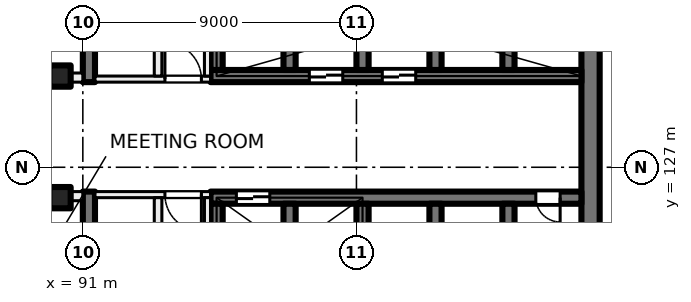
"""IFC4 building model, lengths in metres.
Left out: names, types, materials, properties, quantities, classifications, styles, units other than length and angle.
Written with IfcOpenShell. Run it as: python <this file> out.ifc"""

import sys

from ifc_helpers import new_model, si_unit, direction, frame, frame_2d, origin, origin_2d, place, context, subcontext, project, spatial, rectangle, extrude, element, fill, save


model = new_model("IFC4")
c1 = context("Model", 3, precision=1e-05, world=origin(), true_north=direction((0.0, 1.0)))
c2 = subcontext(c1, "Body", "Model", "MODEL_VIEW")
j1 = project(units=[si_unit("LENGTHUNIT", "METRE"), si_unit("PLANEANGLEUNIT", "RADIAN")], contexts=[c1])
p1 = place(None, origin())
s1 = spatial("IfcSite", under=j1, at=p1, CompositionType="ELEMENT")
p2 = place(p1, origin())
s2 = spatial("IfcBuilding", under=s1, at=p2, CompositionType="ELEMENT")
p3 = place(p2, frame((0.0, 0.0, 39.5)))
s3 = spatial("IfcBuildingStorey", under=s2, at=p3, CompositionType="ELEMENT", Elevation=39.5)
for number, where, z_axis, x_axis in (
    (1, (90.25, 130.0, 0.0), (0.0, 0.0, 1.0), (1.0, 0.0, 0.0)),
    (2, (90.25, 126.0, 0.0), (0.0, 0.0, 1.0), (1.0, 0.0, 0.0)),
):
    element("IfcColumn", number, at=place(p3, frame(where, z_axis=z_axis, x_axis=x_axis)), inside=s3, PredefinedType="COLUMN", context=c2, shape_type="SweptSolid", body=[
        extrude(rectangle(XDim=0.7, YDim=0.7, at=origin_2d()), origin(), (0.0, 0.0, 1.0), 4.0),
    ])
p4 = place(p3, frame((107.7, 135.2, 0.0), z_axis=(0.0, 0.0, 1.0), x_axis=(0.0, -1.0, 0.0)))
e3 = element("IfcWall", 3, at=p4, inside=s3, PredefinedType="SHEAR", context=c2, shape_type="SweptSolid", body=[
    extrude(rectangle(XDim=14.4, YDim=0.6, at=frame_2d((7.2, 0.0))), origin(), (0.0, 0.0, 1.0), 4.0),
])
p5 = place(p3, frame((107.4, 130.0, 0.0), z_axis=(0.0, 0.0, 1.0), x_axis=(-1.0, 0.0, 0.0)))
e4 = element("IfcWall", 4, at=p5, inside=s3, PredefinedType="SHEAR", context=c2, shape_type="SweptSolid", body=[
    extrude(rectangle(XDim=12.2, YDim=0.4, at=frame_2d((6.1, 0.0))), origin(), (0.0, 0.0, 1.0), 4.0),
])
p6 = place(p5, frame((5.45, 0.0, 0.0)))
e5 = element("IfcOpeningElement", 5, at=p6, cuts=e4, PredefinedType="OPENING", context=c2, shape_type="SweptSolid", body=[
    extrude(rectangle(XDim=1.1, YDim=2.1, at=frame_2d((0.55, 1.05))), frame((0.0, 0.21, 0.0), z_axis=(0.0, -1.0, 0.0), x_axis=(1.0, 0.0, 0.0)), (0.0, 0.0, 1.0), 0.42),
])
p7 = place(p5, frame((7.85, 0.0, 0.0)))
e6 = element("IfcOpeningElement", 6, at=p7, cuts=e4, PredefinedType="OPENING", context=c2, shape_type="SweptSolid", body=[
    extrude(rectangle(XDim=1.1, YDim=2.1, at=frame_2d((0.55, 1.05))), frame((0.0, 0.21, 0.0), z_axis=(0.0, -1.0, 0.0), x_axis=(1.0, 0.0, 0.0)), (0.0, 0.0, 1.0), 0.42),
])
for number, where, z_axis, x_axis in (
    (7, (105.0, 133.2, 0.0), (0.0, 0.0, 1.0), (0.0, -1.0, 0.0)),
    (8, (102.6, 133.2, 0.0), (0.0, 0.0, 1.0), (0.0, -1.0, 0.0)),
    (9, (100.2, 133.2, 0.0), (0.0, 0.0, 1.0), (0.0, -1.0, 0.0)),
    (10, (97.8, 133.2, 0.0), (0.0, 0.0, 1.0), (0.0, -1.0, 0.0)),
    (11, (95.4, 133.2, 0.0), (0.0, 0.0, 1.0), (0.0, -1.0, 0.0)),
):
    element("IfcWall", number, at=place(p3, frame(where, z_axis=z_axis, x_axis=x_axis)), inside=s3, PredefinedType="SHEAR", context=c2, shape_type="SweptSolid", body=[
        extrude(rectangle(XDim=3.0, YDim=0.4, at=frame_2d((1.5, 0.0))), origin(), (0.0, 0.0, 1.0), 4.0),
    ])
p8 = place(p3, frame((107.4, 126.0, 0.0), z_axis=(0.0, 0.0, 1.0), x_axis=(-1.0, 0.0, 0.0)))
e12 = element("IfcWall", 12, at=p8, inside=s3, PredefinedType="SHEAR", context=c2, shape_type="SweptSolid", body=[
    extrude(rectangle(XDim=12.2, YDim=0.4, at=frame_2d((6.1, 0.0))), origin(), (0.0, 0.0, 1.0), 4.0),
])
p9 = place(p8, frame((10.25, 0.0, 0.0)))
e13 = element("IfcOpeningElement", 13, at=p9, cuts=e12, PredefinedType="OPENING", context=c2, shape_type="SweptSolid", body=[
    extrude(rectangle(XDim=1.1, YDim=2.1, at=frame_2d((0.55, 1.05))), frame((0.0, 0.21, 0.0), z_axis=(0.0, -1.0, 0.0), x_axis=(1.0, 0.0, 0.0)), (0.0, 0.0, 1.0), 0.42),
])
p10 = place(p8, frame((0.7, 0.0, 0.0)))
e14 = element("IfcOpeningElement", 14, at=p10, cuts=e12, PredefinedType="OPENING", context=c2, shape_type="SweptSolid", body=[
    extrude(rectangle(XDim=0.8, YDim=2.1, at=frame_2d((0.4, 1.05))), frame((0.0, 0.21, 0.0), z_axis=(0.0, -1.0, 0.0), x_axis=(1.0, 0.0, 0.0)), (0.0, 0.0, 1.0), 0.42),
])
for number, where, z_axis, x_axis in (
    (15, (105.0, 125.8, 0.0), (0.0, 0.0, 1.0), (0.0, -1.0, 0.0)),
    (16, (102.6, 125.8, 0.0), (0.0, 0.0, 1.0), (0.0, -1.0, 0.0)),
    (17, (100.2, 125.8, 0.0), (0.0, 0.0, 1.0), (0.0, -1.0, 0.0)),
    (18, (97.8, 125.8, 0.0), (0.0, 0.0, 1.0), (0.0, -1.0, 0.0)),
    (19, (95.4, 125.8, 0.0), (0.0, 0.0, 1.0), (0.0, -1.0, 0.0)),
):
    element("IfcWall", number, at=place(p3, frame(where, z_axis=z_axis, x_axis=x_axis)), inside=s3, PredefinedType="SHEAR", context=c2, shape_type="SweptSolid", body=[
        extrude(rectangle(XDim=3.0, YDim=0.4, at=frame_2d((1.5, 0.0))), origin(), (0.0, 0.0, 1.0), 4.0),
    ])
for number, where, z_axis, x_axis in (
    (20, (91.2, 138.4, 0.0), (0.0, 0.0, 1.0), (0.0, -1.0, 0.0)),
    (21, (91.2, 126.2, 0.0), (0.0, 0.0, 1.0), (0.0, -1.0, 0.0)),
):
    element("IfcWall", number, at=place(p3, frame(where, z_axis=z_axis, x_axis=x_axis)), inside=s3, PredefinedType="SHEAR", context=c2, shape_type="SweptSolid", body=[
        extrude(rectangle(XDim=8.6, YDim=0.4, at=frame_2d((4.3, 0.0))), origin(), (0.0, 0.0, 1.0), 4.0),
    ])
p11 = place(p3, frame((95.2, 126.1, 0.0), z_axis=(0.0, 0.0, 1.0), x_axis=(-1.0, 0.0, 0.0)))
e22 = element("IfcWall", 22, at=p11, inside=s3, PredefinedType="PARTITIONING", context=c2, shape_type="SweptSolid", body=[
    extrude(rectangle(XDim=3.8, YDim=0.2, at=frame_2d((1.9, 0.0))), origin(), (0.0, 0.0, 1.0), 3.625),
])
p12 = place(p11, frame((0.3, 0.0, 0.0)))
e23 = element("IfcOpeningElement", 23, at=p12, cuts=e22, PredefinedType="OPENING", context=c2, shape_type="SweptSolid", body=[
    extrude(rectangle(XDim=1.2, YDim=2.1, at=frame_2d((0.6, 1.05))), frame((0.0, 0.11, 0.0), z_axis=(0.0, -1.0, 0.0), x_axis=(1.0, 0.0, 0.0)), (0.0, 0.0, 1.0), 0.22),
])
p13 = place(p3, frame((95.1, 117.6, 0.0), z_axis=(0.0, 0.0, 1.0), x_axis=(0.0, 1.0, 0.0)))
e24 = element("IfcWall", 24, at=p13, inside=s3, PredefinedType="PARTITIONING", context=c2, shape_type="SweptSolid", body=[
    extrude(rectangle(XDim=8.4, YDim=0.2, at=frame_2d((4.2, 0.0))), origin(), (0.0, 0.0, 1.0), 3.625),
])
p14 = place(p13, frame((1.65, 0.0, 0.0)))
e25 = element("IfcOpeningElement", 25, at=p14, cuts=e24, PredefinedType="OPENING", context=c2, shape_type="SweptSolid", body=[
    extrude(rectangle(XDim=1.5, YDim=2.1, at=frame_2d((0.75, 1.05))), frame((0.0, 0.11, 0.0), z_axis=(0.0, -1.0, 0.0), x_axis=(1.0, 0.0, 0.0)), (0.0, 0.0, 1.0), 0.22),
])
p15 = place(p3, frame((93.475, 117.6, 0.0), z_axis=(0.0, 0.0, 1.0), x_axis=(0.0, 1.0, 0.0)))
e26 = element("IfcWall", 26, at=p15, inside=s3, PredefinedType="PARTITIONING", context=c2, shape_type="SweptSolid", body=[
    extrude(rectangle(XDim=8.4, YDim=0.25, at=frame_2d((4.2, 0.0))), origin(), (0.0, 0.0, 1.0), 3.625),
])
p16 = place(p15, frame((5.825, 0.0, 0.0)))
e27 = element("IfcOpeningElement", 27, at=p16, cuts=e26, PredefinedType="OPENING", context=c2, shape_type="SweptSolid", body=[
    extrude(rectangle(XDim=1.0, YDim=2.1, at=frame_2d((0.5, 1.05))), frame((0.0, 0.135, 0.0), z_axis=(0.0, -1.0, 0.0), x_axis=(1.0, 0.0, 0.0)), (0.0, 0.0, 1.0), 0.27),
])
p17 = place(p15, frame((1.575, 0.0, 0.0)))
e28 = element("IfcOpeningElement", 28, at=p17, cuts=e26, PredefinedType="OPENING", context=c2, shape_type="SweptSolid", body=[
    extrude(rectangle(XDim=1.0, YDim=2.1, at=frame_2d((0.5, 1.05))), frame((0.0, 0.135, 0.0), z_axis=(0.0, -1.0, 0.0), x_axis=(1.0, 0.0, 0.0)), (0.0, 0.0, 1.0), 0.27),
])
p18 = place(p3, frame((91.4, 129.9, 0.0), z_axis=(0.0, 0.0, 1.0), x_axis=(1.0, 0.0, 0.0)))
e29 = element("IfcWall", 29, at=p18, inside=s3, PredefinedType="PARTITIONING", context=c2, shape_type="SweptSolid", body=[
    extrude(rectangle(XDim=3.8, YDim=0.2, at=frame_2d((1.9, 0.0))), origin(), (0.0, 0.0, 1.0), 3.625),
])
p19 = place(p18, frame((2.3, 0.0, 0.0)))
e30 = element("IfcOpeningElement", 30, at=p19, cuts=e29, PredefinedType="OPENING", context=c2, shape_type="SweptSolid", body=[
    extrude(rectangle(XDim=1.2, YDim=2.1, at=frame_2d((0.6, 1.05))), frame((0.0, 0.11, 0.0), z_axis=(0.0, -1.0, 0.0), x_axis=(1.0, 0.0, 0.0)), (0.0, 0.0, 1.0), 0.22),
])
p20 = place(p3, frame((95.1, 130.0, 0.0), z_axis=(0.0, 0.0, 1.0), x_axis=(0.0, 1.0, 0.0)))
e31 = element("IfcWall", 31, at=p20, inside=s3, PredefinedType="PARTITIONING", context=c2, shape_type="SweptSolid", body=[
    extrude(rectangle(XDim=8.4, YDim=0.2, at=frame_2d((4.2, 0.0))), origin(), (0.0, 0.0, 1.0), 3.625),
])
p21 = place(p20, frame((5.25, 0.0, 0.0)))
e32 = element("IfcOpeningElement", 32, at=p21, cuts=e31, PredefinedType="OPENING", context=c2, shape_type="SweptSolid", body=[
    extrude(rectangle(XDim=1.5, YDim=2.1, at=frame_2d((0.75, 1.05))), frame((0.0, 0.11, 0.0), z_axis=(0.0, -1.0, 0.0), x_axis=(1.0, 0.0, 0.0)), (0.0, 0.0, 1.0), 0.22),
])
p22 = place(p3, frame((93.475, 130.0, 0.0), z_axis=(0.0, 0.0, 1.0), x_axis=(0.0, 1.0, 0.0)))
e33 = element("IfcWall", 33, at=p22, inside=s3, PredefinedType="PARTITIONING", context=c2, shape_type="SweptSolid", body=[
    extrude(rectangle(XDim=8.4, YDim=0.25, at=frame_2d((4.2, 0.0))), origin(), (0.0, 0.0, 1.0), 3.625),
])
p23 = place(p22, frame((1.675, 0.0, 0.0)))
e34 = element("IfcOpeningElement", 34, at=p23, cuts=e33, PredefinedType="OPENING", context=c2, shape_type="SweptSolid", body=[
    extrude(rectangle(XDim=0.8, YDim=2.1, at=frame_2d((0.4, 1.05))), frame((0.0, 0.135, 0.0), z_axis=(0.0, -1.0, 0.0), x_axis=(1.0, 0.0, 0.0)), (0.0, 0.0, 1.0), 0.27),
])
p24 = place(p22, frame((5.925, 0.0, 0.0)))
e35 = element("IfcOpeningElement", 35, at=p24, cuts=e33, PredefinedType="OPENING", context=c2, shape_type="SweptSolid", body=[
    extrude(rectangle(XDim=0.8, YDim=2.1, at=frame_2d((0.4, 1.05))), frame((0.0, 0.135, 0.0), z_axis=(0.0, -1.0, 0.0), x_axis=(1.0, 0.0, 0.0)), (0.0, 0.0, 1.0), 0.27),
])
p25 = place(p3, frame((72.5, 129.95, 0.0), z_axis=(0.0, 0.0, 1.0), x_axis=(1.0, 0.0, 0.0)))
e36 = element("IfcWall", 36, at=p25, inside=s3, PredefinedType="PARTITIONING", context=c2, shape_type="SweptSolid", body=[
    extrude(rectangle(XDim=18.5, YDim=0.3, at=frame_2d((9.25, 0.0))), origin(), (0.0, 0.0, 1.0), 3.625),
])
p26 = place(p25, frame((2.275, 0.0, 0.0)))
e37 = element("IfcOpeningElement", 37, at=p26, cuts=e36, PredefinedType="OPENING", context=c2, shape_type="SweptSolid", body=[
    extrude(rectangle(XDim=1.2, YDim=2.1, at=frame_2d((0.6, 1.05))), frame((0.0, 0.16, 0.0), z_axis=(0.0, -1.0, 0.0), x_axis=(1.0, 0.0, 0.0)), (0.0, 0.0, 1.0), 0.32),
])
p27 = place(p25, frame((11.225, 0.0, 0.0)))
e38 = element("IfcOpeningElement", 38, at=p27, cuts=e36, PredefinedType="OPENING", context=c2, shape_type="SweptSolid", body=[
    extrude(rectangle(XDim=1.8, YDim=2.1, at=frame_2d((0.9, 1.05))), frame((0.0, 0.16, 0.0), z_axis=(0.0, -1.0, 0.0), x_axis=(1.0, 0.0, 0.0)), (0.0, 0.0, 1.0), 0.32),
])
p28 = place(p3, frame((91.0, 126.05, 0.0), z_axis=(0.0, 0.0, 1.0), x_axis=(-1.0, 0.0, 0.0)))
e39 = element("IfcWall", 39, at=p28, inside=s3, PredefinedType="PARTITIONING", context=c2, shape_type="SweptSolid", body=[
    extrude(rectangle(XDim=43.785, YDim=0.3, at=frame_2d((21.893, 0.0))), origin(), (0.0, 0.0, 1.0), 3.625),
])
p29 = place(p28, frame((2.025, 0.0, 0.0)))
e40 = element("IfcOpeningElement", 40, at=p29, cuts=e39, PredefinedType="OPENING", context=c2, shape_type="SweptSolid", body=[
    extrude(rectangle(XDim=1.2, YDim=2.1, at=frame_2d((0.6, 1.05))), frame((0.0, 0.16, 0.0), z_axis=(0.0, -1.0, 0.0), x_axis=(1.0, 0.0, 0.0)), (0.0, 0.0, 1.0), 0.32),
])
p30 = place(p28, frame((6.9, 0.0, 0.0)))
e41 = element("IfcOpeningElement", 41, at=p30, cuts=e39, PredefinedType="OPENING", context=c2, shape_type="SweptSolid", body=[
    extrude(rectangle(XDim=1.2, YDim=2.1, at=frame_2d((0.6, 1.05))), frame((0.0, 0.16, 0.0), z_axis=(0.0, -1.0, 0.0), x_axis=(1.0, 0.0, 0.0)), (0.0, 0.0, 1.0), 0.32),
])
p31 = place(p28, frame((15.6, 0.0, 0.0)))
e42 = element("IfcOpeningElement", 42, at=p31, cuts=e39, PredefinedType="OPENING", context=c2, shape_type="SweptSolid", body=[
    extrude(rectangle(XDim=1.8, YDim=2.1, at=frame_2d((0.9, 1.05))), frame((0.0, 0.16, 0.0), z_axis=(0.0, -1.0, 0.0), x_axis=(1.0, 0.0, 0.0)), (0.0, 0.0, 1.0), 0.32),
])
p32 = place(p28, frame((39.296, 0.0, 0.0)))
e43 = element("IfcOpeningElement", 43, at=p32, cuts=e39, PredefinedType="OPENING", context=c2, shape_type="SweptSolid", body=[
    extrude(rectangle(XDim=1.8, YDim=2.1, at=frame_2d((0.9, 1.05))), frame((0.0, 0.16, 0.0), z_axis=(0.0, -1.0, 0.0), x_axis=(1.0, 0.0, 0.0)), (0.0, 0.0, 1.0), 0.32),
])
p33 = place(p9, origin())
e44 = element("IfcDoor", 44, at=p33, inside=s3, OperationType="DOUBLE_DOOR_SLIDING", PredefinedType="DOOR", context=c2, shape_type="SweptSolid", body=[
    extrude(rectangle(XDim=1.1, YDim=2.1, at=frame_2d((0.55, 1.05))), frame((0.0, 0.025, 0.0), z_axis=(0.0, -1.0, 0.0), x_axis=(1.0, 0.0, 0.0)), (0.0, 0.0, 1.0), 0.05),
])
fill(e13, e44)
p34 = place(p6, origin())
e45 = element("IfcDoor", 45, at=p34, inside=s3, OperationType="DOUBLE_DOOR_SLIDING", PredefinedType="DOOR", context=c2, shape_type="SweptSolid", body=[
    extrude(rectangle(XDim=1.1, YDim=2.1, at=frame_2d((0.55, 1.05))), frame((0.0, 0.025, 0.0), z_axis=(0.0, -1.0, 0.0), x_axis=(1.0, 0.0, 0.0)), (0.0, 0.0, 1.0), 0.05),
])
fill(e5, e45)
p35 = place(p7, origin())
e46 = element("IfcDoor", 46, at=p35, inside=s3, OperationType="DOUBLE_DOOR_SLIDING", PredefinedType="DOOR", context=c2, shape_type="SweptSolid", body=[
    extrude(rectangle(XDim=1.1, YDim=2.1, at=frame_2d((0.55, 1.05))), frame((0.0, 0.025, 0.0), z_axis=(0.0, -1.0, 0.0), x_axis=(1.0, 0.0, 0.0)), (0.0, 0.0, 1.0), 0.05),
])
fill(e6, e46)
p36 = place(p10, origin())
e47 = element("IfcDoor", 47, at=p36, inside=s3, OperationType="SINGLE_SWING_LEFT", PredefinedType="DOOR", context=c2, shape_type="SweptSolid", body=[
    extrude(rectangle(XDim=0.8, YDim=2.1, at=frame_2d((0.4, 1.05))), frame((0.0, 0.025, 0.0), z_axis=(0.0, -1.0, 0.0), x_axis=(1.0, 0.0, 0.0)), (0.0, 0.0, 1.0), 0.05),
])
fill(e14, e47)
p37 = place(p12, origin())
e48 = element("IfcDoor", 48, at=p37, inside=s3, OperationType="DOUBLE_DOOR_SINGLE_SWING", PredefinedType="DOOR", context=c2, shape_type="SweptSolid", body=[
    extrude(rectangle(XDim=1.2, YDim=2.1, at=frame_2d((0.6, 1.05))), frame((0.0, 0.025, 0.0), z_axis=(0.0, -1.0, 0.0), x_axis=(1.0, 0.0, 0.0)), (0.0, 0.0, 1.0), 0.05),
])
fill(e23, e48)
p38 = place(p19, origin())
e49 = element("IfcDoor", 49, at=p38, inside=s3, OperationType="DOUBLE_DOOR_SINGLE_SWING", PredefinedType="DOOR", context=c2, shape_type="SweptSolid", body=[
    extrude(rectangle(XDim=1.2, YDim=2.1, at=frame_2d((0.6, 1.05))), frame((0.0, 0.025, 0.0), z_axis=(0.0, -1.0, 0.0), x_axis=(1.0, 0.0, 0.0)), (0.0, 0.0, 1.0), 0.05),
])
fill(e30, e49)
save(model, sys.argv[1])
